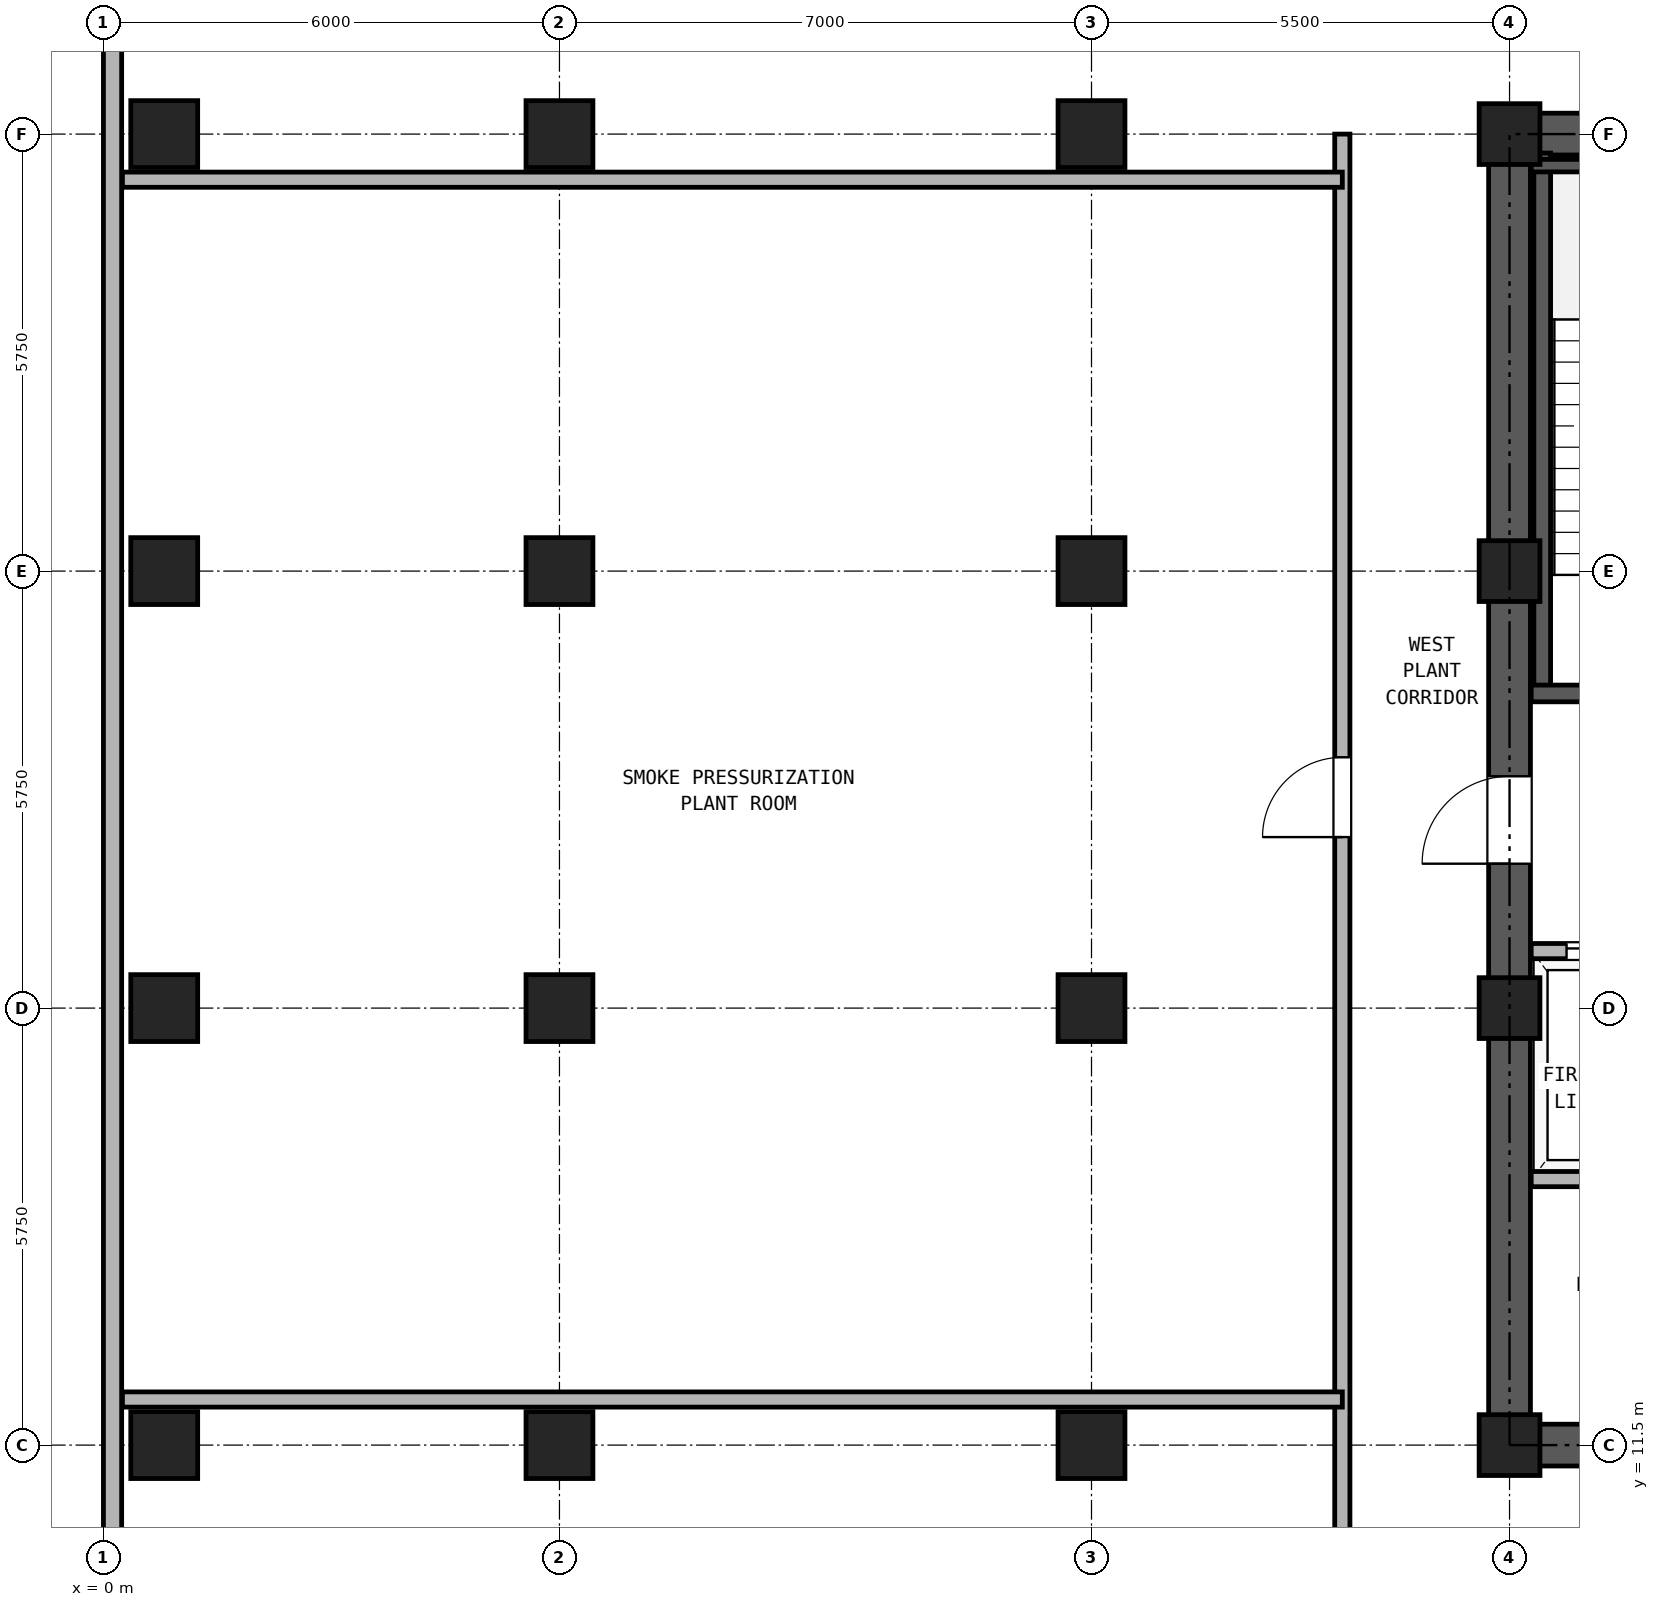
"""IFC4 building model, lengths in metres.
Left out: names, types, materials, properties, quantities, classifications, styles, units other than length and angle.
Written with IfcOpenShell. Run it as: python <this file> out.ifc"""

import sys

from ifc_helpers import new_model, si_unit, direction, frame, frame_2d, origin, origin_2d, place, context, subcontext, project, spatial, rectangle, hollow_rectangle, extrude, source, transform, mapped, element, fill, save


model = new_model("IFC4")
c1 = context("Model", 3, precision=1e-05, world=origin(), true_north=direction((0.0, 1.0)))
c2 = subcontext(c1, "Body", "Model", "MODEL_VIEW")
j1 = project(units=[si_unit("LENGTHUNIT", "METRE"), si_unit("PLANEANGLEUNIT", "RADIAN")], contexts=[c1])
p1 = place(None, origin())
s1 = spatial("IfcSite", under=j1, at=p1, CompositionType="ELEMENT")
p2 = place(p1, origin())
s2 = spatial("IfcBuilding", under=s1, at=p2, CompositionType="ELEMENT")
p3 = place(p2, frame((0.0, 0.0, 143.9)))
s3 = spatial("IfcBuildingStorey", under=s2, at=p3, CompositionType="ELEMENT", Elevation=143.9)
m1 = source(origin(), c2, "Body", "SweptSolid", [
    extrude(hollow_rectangle(XDim=0.88, YDim=0.88, WallThickness=0.05, at=origin_2d()), origin(), (0.0, 0.0, 1.0), 4.25),
])
for number, where, z_axis, x_axis in (
    (1, (0.8, 11.5, 0.0), (0.0, 0.0, 1.0), (1.0, 0.0, 0.0)),
    (2, (0.8, 17.25, 0.0), (0.0, 0.0, 1.0), (1.0, 0.0, 0.0)),
    (3, (0.8, 23.0, 0.0), (0.0, 0.0, 1.0), (1.0, 0.0, 0.0)),
    (4, (0.8, 28.75, 0.0), (0.0, 0.0, 1.0), (1.0, 0.0, 0.0)),
    (5, (6.0, 11.5, 0.0), (0.0, 0.0, 1.0), (1.0, 0.0, 0.0)),
    (6, (6.0, 17.25, 0.0), (0.0, 0.0, 1.0), (1.0, 0.0, 0.0)),
    (7, (6.0, 23.0, 0.0), (0.0, 0.0, 1.0), (1.0, 0.0, 0.0)),
    (8, (6.0, 28.75, 0.0), (0.0, 0.0, 1.0), (1.0, 0.0, 0.0)),
    (9, (13.0, 11.5, 0.0), (0.0, 0.0, 1.0), (1.0, 0.0, 0.0)),
    (10, (13.0, 17.25, 0.0), (0.0, 0.0, 1.0), (1.0, 0.0, 0.0)),
    (11, (13.0, 23.0, 0.0), (0.0, 0.0, 1.0), (1.0, 0.0, 0.0)),
    (12, (13.0, 28.75, 0.0), (0.0, 0.0, 1.0), (1.0, 0.0, 0.0)),
):
    element("IfcColumn", number, at=place(p3, frame(where, z_axis=z_axis, x_axis=x_axis)), inside=s3, PredefinedType="COLUMN", context=c2, shape_type="MappedRepresentation", body=[
        mapped(m1, transform((0.0, 0.0, 0.0), x_axis=(1.0, 0.0, 0.0), y_axis=(0.0, 1.0, 0.0), z_axis=(0.0, 0.0, 1.0), scale=1.0)),
    ])
m2 = source(origin(), c2, "Body", "SweptSolid", [
    extrude(hollow_rectangle(XDim=0.8, YDim=0.8, WallThickness=0.045, at=origin_2d()), origin(), (0.0, 0.0, 1.0), 4.25),
])
for number, where, z_axis, x_axis in (
    (13, (18.5, 11.5, 0.0), (0.0, 0.0, 1.0), (1.0, 0.0, 0.0)),
    (14, (18.5, 17.25, 0.0), (0.0, 0.0, 1.0), (1.0, 0.0, 0.0)),
    (15, (18.5, 23.0, 0.0), (0.0, 0.0, 1.0), (1.0, 0.0, 0.0)),
    (16, (18.5, 28.75, 0.0), (0.0, 0.0, 1.0), (1.0, 0.0, 0.0)),
):
    element("IfcColumn", number, at=place(p3, frame(where, z_axis=z_axis, x_axis=x_axis)), inside=s3, PredefinedType="COLUMN", context=c2, shape_type="MappedRepresentation", body=[
        mapped(m2, transform((0.0, 0.0, 0.0), x_axis=(1.0, 0.0, 0.0), y_axis=(0.0, 1.0, 0.0), z_axis=(0.0, 0.0, 1.0), scale=1.0)),
    ])
p4 = place(p3, frame((0.12, 31.5, 0.0), z_axis=(0.0, 0.0, 1.0), x_axis=(0.0, -1.0, 0.0)))
e17 = element("IfcWall", 17, at=p4, inside=s3, PredefinedType="SOLIDWALL", context=c2, shape_type="SweptSolid", body=[
    extrude(rectangle(XDim=27.7, YDim=0.24, at=frame_2d((13.85, 0.0))), origin(), (0.0, 0.0, 1.0), 4.25),
])
p5 = place(p3, frame((18.225, 11.5, 0.0), z_axis=(0.0, 0.0, 1.0), x_axis=(1.0, 0.0, 0.0)))
e18 = element("IfcWall", 18, at=p5, inside=s3, PredefinedType="SHEAR", context=c2, shape_type="SweptSolid", body=[
    extrude(rectangle(XDim=10.55, YDim=0.55, at=frame_2d((5.275, 0.0))), origin(), (0.0, 0.0, 1.0), 4.25),
])
p6 = place(p5, frame((2.375, 0.0, 0.0)))
e19 = element("IfcOpeningElement", 19, at=p6, cuts=e18, PredefinedType="OPENING", context=c2, shape_type="SweptSolid", body=[
    extrude(rectangle(XDim=0.95, YDim=2.15, at=frame_2d((0.475, 1.075))), frame((0.0, 0.285, 0.0), z_axis=(0.0, -1.0, 0.0), x_axis=(1.0, 0.0, 0.0)), (0.0, 0.0, 1.0), 0.57),
])
p7 = place(p5, frame((5.875, 0.0, 0.0)))
e20 = element("IfcOpeningElement", 20, at=p7, cuts=e18, PredefinedType="OPENING", context=c2, shape_type="SweptSolid", body=[
    extrude(rectangle(XDim=1.1, YDim=2.25, at=frame_2d((0.55, 1.125))), frame((0.0, 0.285, 0.0), z_axis=(0.0, -1.0, 0.0), x_axis=(1.0, 0.0, 0.0)), (0.0, 0.0, 1.0), 0.57),
])
p8 = place(p5, frame((8.275, 0.0, 0.0)))
e21 = element("IfcOpeningElement", 21, at=p8, cuts=e18, PredefinedType="OPENING", context=c2, shape_type="SweptSolid", body=[
    extrude(rectangle(XDim=1.1, YDim=2.25, at=frame_2d((0.55, 1.125))), frame((0.0, 0.285, 0.0), z_axis=(0.0, -1.0, 0.0), x_axis=(1.0, 0.0, 0.0)), (0.0, 0.0, 1.0), 0.57),
])
p9 = place(p3, frame((18.225, 28.75, 0.0), z_axis=(0.0, 0.0, 1.0), x_axis=(1.0, 0.0, 0.0)))
e22 = element("IfcWall", 22, at=p9, inside=s3, PredefinedType="SHEAR", context=c2, shape_type="SweptSolid", body=[
    extrude(rectangle(XDim=10.55, YDim=0.55, at=frame_2d((5.275, 0.0))), origin(), (0.0, 0.0, 1.0), 4.25),
])
p10 = place(p9, frame((4.155, 0.0, 0.0)))
e23 = element("IfcOpeningElement", 23, at=p10, cuts=e22, PredefinedType="OPENING", context=c2, shape_type="SweptSolid", body=[
    extrude(rectangle(XDim=0.9, YDim=2.05, at=frame_2d((0.45, 1.025))), frame((0.0, 0.285, 0.0), z_axis=(0.0, -1.0, 0.0), x_axis=(1.0, 0.0, 0.0)), (0.0, 0.0, 1.0), 0.57),
])
p11 = place(p9, frame((5.695, 0.0, 0.0)))
e24 = element("IfcOpeningElement", 24, at=p11, cuts=e22, PredefinedType="OPENING", context=c2, shape_type="SweptSolid", body=[
    extrude(rectangle(XDim=0.9, YDim=2.05, at=frame_2d((0.45, 1.025))), frame((0.0, 0.285, 0.0), z_axis=(0.0, -1.0, 0.0), x_axis=(1.0, 0.0, 0.0)), (0.0, 0.0, 1.0), 0.57),
])
p12 = place(p3, frame((18.5, 11.775, 0.0), z_axis=(0.0, 0.0, 1.0), x_axis=(0.0, 1.0, 0.0)))
e25 = element("IfcWall", 25, at=p12, inside=s3, PredefinedType="SHEAR", context=c2, shape_type="SweptSolid", body=[
    extrude(rectangle(XDim=16.7, YDim=0.55, at=frame_2d((8.35, 0.0))), origin(), (0.0, 0.0, 1.0), 4.25),
])
p13 = place(p12, frame((7.375, 0.0, 0.0)))
e26 = element("IfcOpeningElement", 26, at=p13, cuts=e25, PredefinedType="OPENING", context=c2, shape_type="SweptSolid", body=[
    extrude(rectangle(XDim=1.15, YDim=2.2, at=frame_2d((0.575, 1.1))), frame((0.0, 0.285, 0.0), z_axis=(0.0, -1.0, 0.0), x_axis=(1.0, 0.0, 0.0)), (0.0, 0.0, 1.0), 0.57),
])
p14 = place(p3, frame((18.93, 21.39, 0.0), z_axis=(0.0, 0.0, 1.0), x_axis=(0.0, 1.0, 0.0)))
e27 = element("IfcWall", 27, at=p14, inside=s3, PredefinedType="SOLIDWALL", context=c2, shape_type="SweptSolid", body=[
    extrude(rectangle(XDim=7.11, YDim=0.22, at=frame_2d((3.555, 0.0))), origin(), (0.0, 0.0, 1.0), 4.25),
])
p15 = place(p3, frame((18.785, 28.335, 0.0), z_axis=(0.0, 0.0, 1.0), x_axis=(1.0, 0.0, 0.0)))
e28 = element("IfcWall", 28, at=p15, inside=s3, PredefinedType="PARTITIONING", context=c2, shape_type="SweptSolid", body=[
    extrude(rectangle(XDim=3.325, YDim=0.165, at=frame_2d((1.663, 0.0))), origin(), (0.0, 0.0, 1.0), 4.25),
])
p16 = place(p3, frame((18.785, 21.39, 0.0), z_axis=(0.0, 0.0, 1.0), x_axis=(1.0, 0.0, 0.0)))
e29 = element("IfcWall", 29, at=p16, inside=s3, PredefinedType="SOLIDWALL", context=c2, shape_type="SweptSolid", body=[
    extrude(rectangle(XDim=6.345, YDim=0.22, at=frame_2d((3.172, 0.0))), origin(), (0.0, 0.0, 1.0), 4.25),
])
p17 = place(p16, frame((1.065, 0.0, 0.0)))
e30 = element("IfcOpeningElement", 30, at=p17, cuts=e29, PredefinedType="OPENING", context=c2, shape_type="SweptSolid", body=[
    extrude(rectangle(XDim=1.15, YDim=2.2, at=frame_2d((0.575, 1.1))), frame((0.0, 0.12, 0.0), z_axis=(0.0, -1.0, 0.0), x_axis=(1.0, 0.0, 0.0)), (0.0, 0.0, 1.0), 0.24),
])
p18 = place(p16, frame((4.795, 0.0, 0.0)))
e31 = element("IfcOpeningElement", 31, at=p18, cuts=e29, PredefinedType="OPENING", context=c2, shape_type="SweptSolid", body=[
    extrude(rectangle(XDim=1.1, YDim=2.25, at=frame_2d((0.55, 1.125))), frame((0.0, 0.12, 0.0), z_axis=(0.0, -1.0, 0.0), x_axis=(1.0, 0.0, 0.0)), (0.0, 0.0, 1.0), 0.24),
])
p19 = place(p3, frame((18.785, 18.0, 0.0), z_axis=(0.0, 0.0, 1.0), x_axis=(1.0, 0.0, 0.0)))
e32 = element("IfcWall", 32, at=p19, inside=s3, PredefinedType="PARTITIONING", context=c2, shape_type="SweptSolid", body=[
    extrude(rectangle(XDim=9.43, YDim=0.2, at=frame_2d((4.715, 0.0))), origin(), (0.0, 0.0, 1.0), 4.25),
])
p20 = place(p19, frame((0.465, 0.0, 0.0)))
e33 = element("IfcOpeningElement", 33, at=p20, cuts=e32, PredefinedType="OPENING", context=c2, shape_type="SweptSolid", body=[
    extrude(rectangle(XDim=1.3, YDim=2.3, at=frame_2d((0.65, 1.15))), frame((0.0, 0.11, 0.0), z_axis=(0.0, -1.0, 0.0), x_axis=(1.0, 0.0, 0.0)), (0.0, 0.0, 1.0), 0.22),
])
p21 = place(p19, frame((2.565, 0.0, 0.0)))
e34 = element("IfcOpeningElement", 34, at=p21, cuts=e32, PredefinedType="OPENING", context=c2, shape_type="SweptSolid", body=[
    extrude(rectangle(XDim=1.3, YDim=2.3, at=frame_2d((0.65, 1.15))), frame((0.0, 0.11, 0.0), z_axis=(0.0, -1.0, 0.0), x_axis=(1.0, 0.0, 0.0)), (0.0, 0.0, 1.0), 0.22),
])
p22 = place(p19, frame((7.065, 0.0, 0.0)))
e35 = element("IfcOpeningElement", 35, at=p22, cuts=e32, PredefinedType="OPENING", context=c2, shape_type="SweptSolid", body=[
    extrude(rectangle(XDim=1.0, YDim=2.15, at=frame_2d((0.5, 1.075))), frame((0.0, 0.11, 0.0), z_axis=(0.0, -1.0, 0.0), x_axis=(1.0, 0.0, 0.0)), (0.0, 0.0, 1.0), 0.22),
])
p23 = place(p3, frame((18.785, 15.0, 0.0), z_axis=(0.0, 0.0, 1.0), x_axis=(1.0, 0.0, 0.0)))
e36 = element("IfcWall", 36, at=p23, inside=s3, PredefinedType="PARTITIONING", context=c2, shape_type="SweptSolid", body=[
    extrude(rectangle(XDim=9.43, YDim=0.2, at=frame_2d((4.715, 0.0))), origin(), (0.0, 0.0, 1.0), 4.25),
])
p24 = place(p3, frame((16.3, 8.9, 0.0), z_axis=(0.0, 0.0, 1.0), x_axis=(0.0, 1.0, 0.0)))
e37 = element("IfcWall", 37, at=p24, inside=s3, PredefinedType="PARTITIONING", context=c2, shape_type="SweptSolid", body=[
    extrude(rectangle(XDim=19.85, YDim=0.2, at=frame_2d((9.925, 0.0))), origin(), (0.0, 0.0, 1.0), 4.25),
])
p25 = place(p24, frame((10.6, 0.0, 0.0)))
e38 = element("IfcOpeningElement", 38, at=p25, cuts=e37, PredefinedType="OPENING", context=c2, shape_type="SweptSolid", body=[
    extrude(rectangle(XDim=1.05, YDim=2.15, at=frame_2d((0.525, 1.075))), frame((0.0, 0.11, 0.0), z_axis=(0.0, -1.0, 0.0), x_axis=(1.0, 0.0, 0.0)), (0.0, 0.0, 1.0), 0.22),
])
for number, where, z_axis, x_axis in (
    (39, (0.25, 12.1, 0.0), (0.0, 0.0, 1.0), (1.0, 0.0, 0.0)),
    (40, (0.25, 28.15, 0.0), (0.0, 0.0, 1.0), (1.0, 0.0, 0.0)),
):
    element("IfcWall", number, at=place(p3, frame(where, z_axis=z_axis, x_axis=x_axis)), inside=s3, PredefinedType="PARTITIONING", context=c2, shape_type="SweptSolid", body=[
        extrude(rectangle(XDim=16.05, YDim=0.2, at=frame_2d((8.025, 0.0))), origin(), (0.0, 0.0, 1.0), 4.25),
    ])
p26 = place(p20, origin())
e41 = element("IfcDoor", 41, at=p26, inside=s3, OperationType="DOUBLE_DOOR_SLIDING", PredefinedType="DOOR", context=c2, shape_type="SweptSolid", body=[
    extrude(rectangle(XDim=1.3, YDim=2.3, at=frame_2d((0.65, 1.15))), frame((0.0, 0.025, 0.0), z_axis=(0.0, -1.0, 0.0), x_axis=(1.0, 0.0, 0.0)), (0.0, 0.0, 1.0), 0.05),
])
fill(e33, e41)
p27 = place(p13, frame((1.15, 0.0, 0.0), z_axis=(0.0, 0.0, 1.0), x_axis=(-1.0, 0.0, 0.0)))
e42 = element("IfcDoor", 42, at=p27, inside=s3, OperationType="SINGLE_SWING_LEFT", PredefinedType="DOOR", context=c2, shape_type="SweptSolid", body=[
    extrude(rectangle(XDim=1.15, YDim=2.2, at=frame_2d((0.575, 1.1))), frame((0.0, 0.025, 0.0), z_axis=(0.0, -1.0, 0.0), x_axis=(1.0, 0.0, 0.0)), (0.0, 0.0, 1.0), 0.05),
])
fill(e26, e42)
p28 = place(p25, frame((1.05, 0.0, 0.0), z_axis=(0.0, 0.0, 1.0), x_axis=(-1.0, 0.0, 0.0)))
e43 = element("IfcDoor", 43, at=p28, inside=s3, OperationType="SINGLE_SWING_LEFT", PredefinedType="DOOR", context=c2, shape_type="SweptSolid", body=[
    extrude(rectangle(XDim=1.05, YDim=2.15, at=frame_2d((0.525, 1.075))), frame((0.0, 0.025, 0.0), z_axis=(0.0, -1.0, 0.0), x_axis=(1.0, 0.0, 0.0)), (0.0, 0.0, 1.0), 0.05),
])
fill(e38, e43)
save(model, sys.argv[1])
